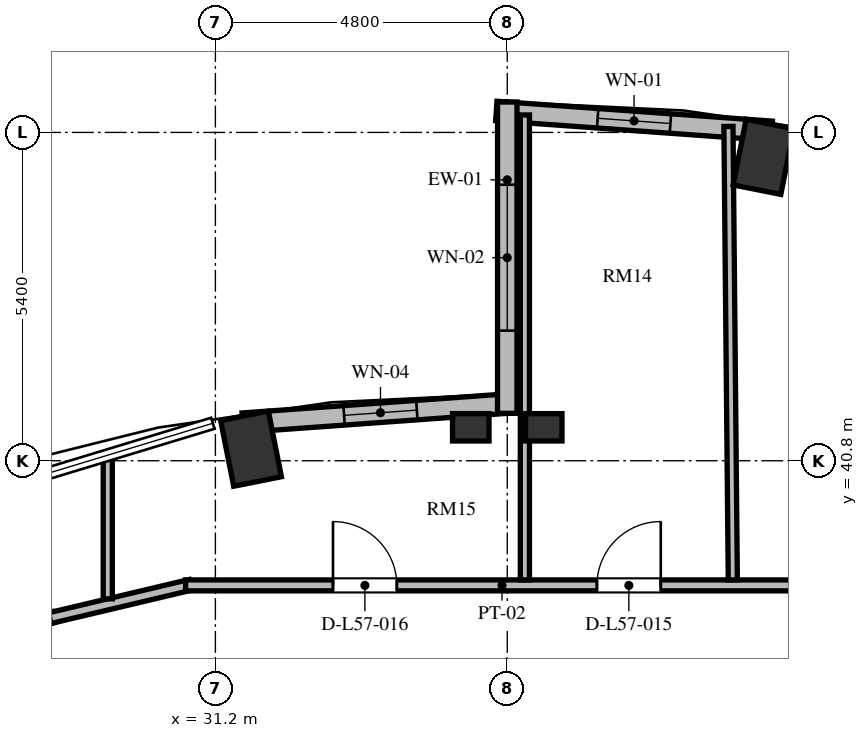
"""IFC4 building model, lengths in metres.
Left out: names, types, materials, properties, quantities, classifications, styles, units other than length and angle.
Written with IfcOpenShell. Run it as: python <this file> out.ifc"""

import sys

from ifc_helpers import new_model, si_unit, direction, frame, frame_2d, origin, origin_2d, place, context, subcontext, project, spatial, rectangle, extrude, element, fill, save


model = new_model("IFC4")
c1 = context("Model", 3, precision=1e-05, world=origin(), true_north=direction((0.0, 1.0)))
c2 = subcontext(c1, "Body", "Model", "MODEL_VIEW")
j1 = project(units=[si_unit("LENGTHUNIT", "METRE"), si_unit("PLANEANGLEUNIT", "RADIAN")], contexts=[c1])
p1 = place(None, origin())
s1 = spatial("IfcSite", under=j1, at=p1, CompositionType="ELEMENT")
p2 = place(p1, origin())
s2 = spatial("IfcBuilding", under=s1, at=p2, CompositionType="ELEMENT")
p3 = place(p2, frame((0.0, 0.0, 220.368)))
s3 = spatial("IfcBuildingStorey", under=s2, at=p3, CompositionType="ELEMENT", Elevation=220.368)
for number, where, z_axis, x_axis in (
    (1, (40.214, 45.798, 0.0), (0.0, 0.0, 1.0), (0.195, 0.981, 0.0)),
    (2, (31.786, 40.998, 0.0), (0.0, 0.0, 1.0), (-0.195, 0.981, 0.0)),
):
    element("IfcColumn", number, at=place(p3, frame(where, z_axis=z_axis, x_axis=x_axis)), inside=s3, PredefinedType="COLUMN", context=c2, shape_type="SweptSolid", body=[
        extrude(rectangle(XDim=1.1, YDim=0.8, at=origin_2d()), origin(), (0.0, 0.0, 1.0), 3.648),
    ])
for number, where, z_axis, x_axis in (
    (3, (35.4, 41.35, 0.0), (0.0, 0.0, 1.0), (1.0, 0.0, 0.0)),
    (4, (36.6, 41.35, 0.0), (0.0, 0.0, 1.0), (1.0, 0.0, 0.0)),
):
    element("IfcColumn", number, at=place(p3, frame(where, z_axis=z_axis, x_axis=x_axis)), inside=s3, PredefinedType="PILASTER", context=c2, shape_type="SweptSolid", body=[
        extrude(rectangle(XDim=0.6, YDim=0.45, at=origin_2d()), origin(), (0.0, 0.0, 1.0), 3.648),
    ])
p4 = place(p3, frame((40.35, 46.226, 0.0), z_axis=(0.0, 0.0, 1.0), x_axis=(-0.997409061056, 0.071938619141, 0.0)))
e5 = element("IfcWall", 5, at=p4, inside=s3, PredefinedType="SOLIDWALL", context=c2, shape_type="SweptSolid", body=[
    extrude(rectangle(XDim=4.541, YDim=0.32, at=frame_2d((2.271, 0.0))), origin(), (0.0, 0.0, 1.0), 3.448),
])
p5 = place(p4, frame((1.67, 0.0, 0.85)))
e6 = element("IfcOpeningElement", 6, at=p5, cuts=e5, PredefinedType="OPENING", context=c2, shape_type="SweptSolid", body=[
    extrude(rectangle(XDim=1.2, YDim=2.2, at=frame_2d((0.6, 1.1))), frame((0.0, 0.17, 0.0), z_axis=(0.0, -1.0, 0.0), x_axis=(1.0, 0.0, 0.0)), (0.0, 0.0, 1.0), 0.34),
])
p6 = place(p3, frame((36.179, 41.753, 0.0), z_axis=(0.0, 0.0, 1.0), x_axis=(-0.997408782787, -0.071942477163, 0.0)))
e7 = element("IfcWall", 7, at=p6, inside=s3, PredefinedType="SOLIDWALL", context=c2, shape_type="SweptSolid", body=[
    extrude(rectangle(XDim=4.541, YDim=0.32, at=frame_2d((2.27, 0.0))), origin(), (0.0, 0.0, 1.0), 3.448),
])
p7 = place(p6, frame((1.67, 0.0, 0.85)))
e8 = element("IfcOpeningElement", 8, at=p7, cuts=e7, PredefinedType="OPENING", context=c2, shape_type="SweptSolid", body=[
    extrude(rectangle(XDim=1.2, YDim=1.8, at=frame_2d((0.6, 0.9))), frame((0.0, 0.17, 0.0), z_axis=(0.0, -1.0, 0.0), x_axis=(1.0, 0.0, 0.0)), (0.0, 0.0, 1.0), 0.34),
])
p8 = place(p3, frame((36.0, 46.7, 0.0), z_axis=(0.0, 0.0, 1.0), x_axis=(0.0, -1.0, 0.0)))
e9 = element("IfcWall", 9, at=p8, inside=s3, PredefinedType="SOLIDWALL", context=c2, shape_type="SweptSolid", body=[
    extrude(rectangle(XDim=5.12, YDim=0.32, at=frame_2d((2.56, 0.0))), origin(), (0.0, 0.0, 1.0), 3.448),
])
p9 = place(p8, frame((1.36, 0.0, 0.84)))
e10 = element("IfcOpeningElement", 10, at=p9, cuts=e9, PredefinedType="OPENING", context=c2, shape_type="SweptSolid", body=[
    extrude(rectangle(XDim=2.4, YDim=2.04, at=frame_2d((1.2, 1.02))), frame((0.0, 0.17, 0.0), z_axis=(0.0, -1.0, 0.0), x_axis=(1.0, 0.0, 0.0)), (0.0, 0.0, 1.0), 0.34),
])
p10 = place(p3, frame((23.294, 36.422, 0.0), z_axis=(0.0, 0.0, 1.0), x_axis=(0.945493277461, 0.325641616316, 0.0)))
e11 = element("IfcWall", 11, at=p10, inside=s3, PredefinedType="PARTITIONING", context=c2, shape_type="SweptSolid", body=[
    extrude(rectangle(XDim=5.562, YDim=0.18, at=frame_2d((2.781, 0.0))), origin(), (0.0, 0.0, 1.0), 3.073),
])
p11 = place(p3, frame((28.476, 38.211, 0.0), z_axis=(0.0, 0.0, 1.0), x_axis=(0.973030562203, 0.230676234189, 0.0)))
e12 = element("IfcWall", 12, at=p11, inside=s3, PredefinedType="PARTITIONING", context=c2, shape_type="SweptSolid", body=[
    extrude(rectangle(XDim=2.377, YDim=0.18, at=frame_2d((1.188, 0.0))), origin(), (0.0, 0.0, 1.0), 3.448),
])
p12 = place(p3, frame((30.71, 38.75, 0.0), z_axis=(0.0, 0.0, 1.0), x_axis=(1.0, 0.0, 0.0)))
e13 = element("IfcWall", 13, at=p12, inside=s3, PredefinedType="PARTITIONING", context=c2, shape_type="SweptSolid", body=[
    extrude(rectangle(XDim=20.815, YDim=0.18, at=frame_2d((10.408, 0.0))), origin(), (0.0, 0.0, 1.0), 3.073),
])
p13 = place(p12, frame((17.654, 0.0, 0.0)))
e14 = element("IfcOpeningElement", 14, at=p13, cuts=e13, PredefinedType="OPENING", context=c2, shape_type="SweptSolid", body=[
    extrude(rectangle(XDim=1.05, YDim=2.15, at=frame_2d((0.525, 1.075))), frame((0.0, 0.1, 0.0), z_axis=(0.0, -1.0, 0.0), x_axis=(1.0, 0.0, 0.0)), (0.0, 0.0, 1.0), 0.2),
])
p14 = place(p12, frame((13.62, 0.0, 0.0)))
e15 = element("IfcOpeningElement", 15, at=p14, cuts=e13, PredefinedType="OPENING", context=c2, shape_type="SweptSolid", body=[
    extrude(rectangle(XDim=1.05, YDim=2.15, at=frame_2d((0.525, 1.075))), frame((0.0, 0.1, 0.0), z_axis=(0.0, -1.0, 0.0), x_axis=(1.0, 0.0, 0.0)), (0.0, 0.0, 1.0), 0.2),
])
p15 = place(p12, frame((10.19, 0.0, 0.0)))
e16 = element("IfcOpeningElement", 16, at=p15, cuts=e13, PredefinedType="OPENING", context=c2, shape_type="SweptSolid", body=[
    extrude(rectangle(XDim=1.05, YDim=2.15, at=frame_2d((0.525, 1.075))), frame((0.0, 0.1, 0.0), z_axis=(0.0, -1.0, 0.0), x_axis=(1.0, 0.0, 0.0)), (0.0, 0.0, 1.0), 0.2),
])
p16 = place(p12, frame((6.765, 0.0, 0.0)))
e17 = element("IfcOpeningElement", 17, at=p16, cuts=e13, PredefinedType="OPENING", context=c2, shape_type="SweptSolid", body=[
    extrude(rectangle(XDim=1.05, YDim=2.15, at=frame_2d((0.525, 1.075))), frame((0.0, 0.1, 0.0), z_axis=(0.0, -1.0, 0.0), x_axis=(1.0, 0.0, 0.0)), (0.0, 0.0, 1.0), 0.2),
])
p17 = place(p12, frame((2.424, 0.0, 0.0)))
e18 = element("IfcOpeningElement", 18, at=p17, cuts=e13, PredefinedType="OPENING", context=c2, shape_type="SweptSolid", body=[
    extrude(rectangle(XDim=1.05, YDim=2.15, at=frame_2d((0.525, 1.075))), frame((0.0, 0.1, 0.0), z_axis=(0.0, -1.0, 0.0), x_axis=(1.0, 0.0, 0.0)), (0.0, 0.0, 1.0), 0.2),
])
p18 = place(p3, frame((29.43, 38.529, 0.0), z_axis=(0.0, 0.0, 1.0), x_axis=(0.0, 1.0, 0.0)))
e19 = element("IfcWall", 19, at=p18, inside=s3, PredefinedType="PARTITIONING", context=c2, shape_type="SweptSolid", body=[
    extrude(rectangle(XDim=2.346, YDim=0.15, at=frame_2d((1.173, 0.0))), origin(), (0.0, 0.0, 1.0), 3.448),
])
p19 = place(p3, frame((36.29, 38.84, 0.0), z_axis=(0.0, 0.0, 1.0), x_axis=(0.0, 1.0, 0.0)))
e20 = element("IfcWall", 20, at=p19, inside=s3, PredefinedType="PARTITIONING", context=c2, shape_type="SweptSolid", body=[
    extrude(rectangle(XDim=7.647, YDim=0.15, at=frame_2d((3.824, 0.0))), origin(), (0.0, 0.0, 1.0), 3.448),
])
p20 = place(p3, frame((39.709, 38.84, 0.0), z_axis=(0.0, 0.0, 1.0), x_axis=(-0.009590393625, 0.999954011118, 0.0)))
e21 = element("IfcWall", 21, at=p20, inside=s3, PredefinedType="PARTITIONING", context=c2, shape_type="SweptSolid", body=[
    extrude(rectangle(XDim=7.459, YDim=0.15, at=frame_2d((3.729, 0.0))), origin(), (0.0, 0.0, 1.0), 2.933),
])
p21 = place(p5, origin())
e22 = element("IfcWindow", 22, at=p21, inside=s3, PartitioningType="SINGLE_PANEL", PredefinedType="WINDOW", context=c2, shape_type="SweptSolid", body=[
    extrude(rectangle(XDim=1.2, YDim=2.2, at=frame_2d((0.6, 1.1))), frame((0.0, 0.03, 0.0), z_axis=(0.0, -1.0, 0.0), x_axis=(1.0, 0.0, 0.0)), (0.0, 0.0, 1.0), 0.06),
])
fill(e6, e22)
p22 = place(p7, origin())
e23 = element("IfcWindow", 23, at=p22, inside=s3, PartitioningType="SINGLE_PANEL", PredefinedType="WINDOW", context=c2, shape_type="SweptSolid", body=[
    extrude(rectangle(XDim=1.2, YDim=1.8, at=frame_2d((0.6, 0.9))), frame((0.0, 0.03, 0.0), z_axis=(0.0, -1.0, 0.0), x_axis=(1.0, 0.0, 0.0)), (0.0, 0.0, 1.0), 0.06),
])
fill(e8, e23)
p23 = place(p9, origin())
e24 = element("IfcWindow", 24, at=p23, inside=s3, PartitioningType="SINGLE_PANEL", PredefinedType="WINDOW", context=c2, shape_type="SweptSolid", body=[
    extrude(rectangle(XDim=2.4, YDim=2.04, at=frame_2d((1.2, 1.02))), frame((0.0, 0.03, 0.0), z_axis=(0.0, -1.0, 0.0), x_axis=(1.0, 0.0, 0.0)), (0.0, 0.0, 1.0), 0.06),
])
fill(e10, e24)
p24 = place(p16, origin())
e25 = element("IfcDoor", 25, at=p24, inside=s3, OperationType="SINGLE_SWING_RIGHT", PredefinedType="DOOR", context=c2, shape_type="SweptSolid", body=[
    extrude(rectangle(XDim=1.05, YDim=2.15, at=frame_2d((0.525, 1.075))), frame((0.0, 0.025, 0.0), z_axis=(0.0, -1.0, 0.0), x_axis=(1.0, 0.0, 0.0)), (0.0, 0.0, 1.0), 0.05),
])
fill(e17, e25)
p25 = place(p17, origin())
e26 = element("IfcDoor", 26, at=p25, inside=s3, OperationType="SINGLE_SWING_LEFT", PredefinedType="DOOR", context=c2, shape_type="SweptSolid", body=[
    extrude(rectangle(XDim=1.05, YDim=2.15, at=frame_2d((0.525, 1.075))), frame((0.0, 0.025, 0.0), z_axis=(0.0, -1.0, 0.0), x_axis=(1.0, 0.0, 0.0)), (0.0, 0.0, 1.0), 0.05),
])
fill(e18, e26)
save(model, sys.argv[1])
